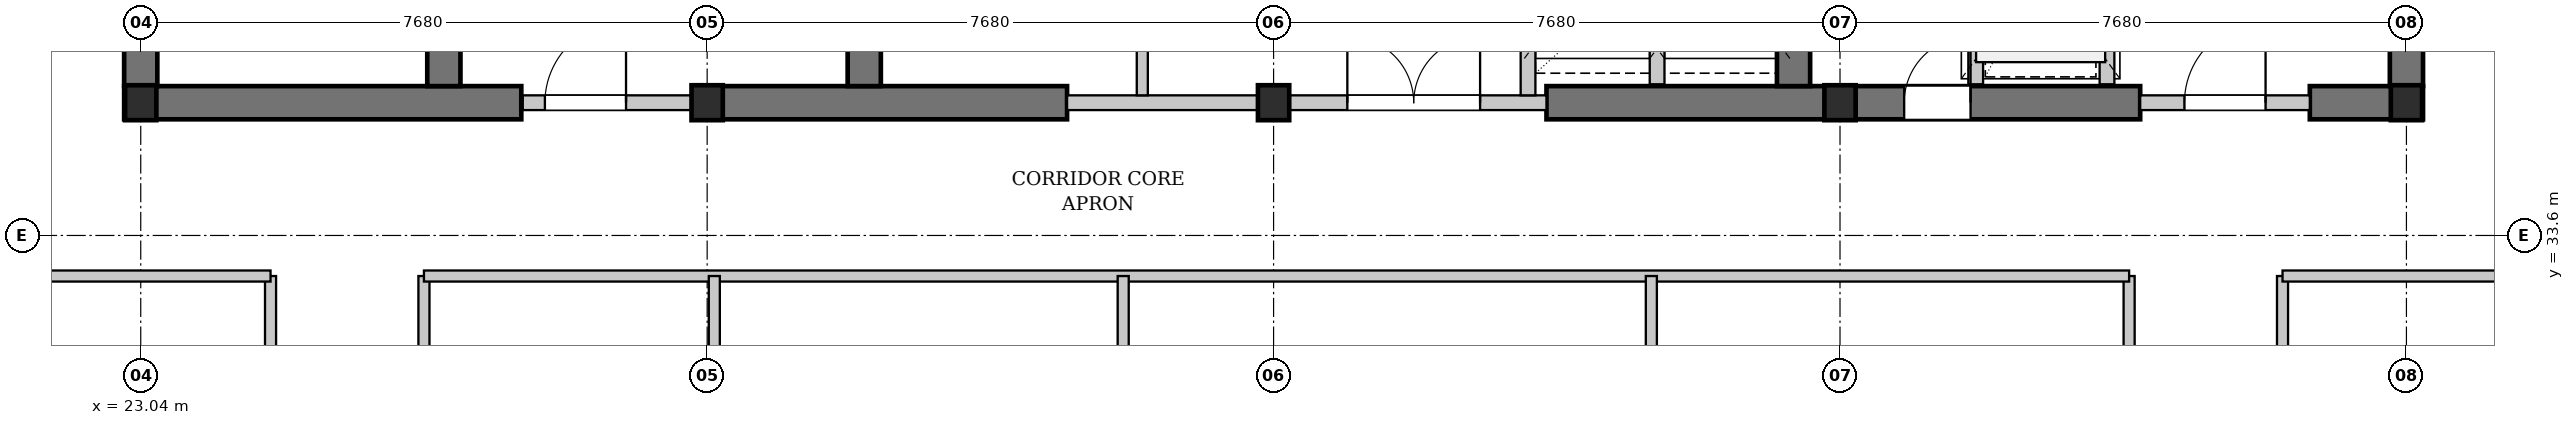
"""IFC4 building model, lengths in metres.
Left out: names, types, materials, properties, quantities, classifications, styles, units other than length and angle.
Written with IfcOpenShell. Run it as: python <this file> out.ifc"""

import sys

from ifc_helpers import new_model, si_unit, direction, frame, frame_2d, origin, origin_2d, place, context, subcontext, project, spatial, rectangle, i_section, extrude, element, fill, save


model = new_model("IFC4")
c1 = context("Model", 3, precision=1e-05, world=origin(), true_north=direction((0.0, 1.0)))
c2 = subcontext(c1, "Body", "Model", "MODEL_VIEW")
j1 = project(units=[si_unit("LENGTHUNIT", "METRE"), si_unit("PLANEANGLEUNIT", "RADIAN")], contexts=[c1])
p1 = place(None, origin())
s1 = spatial("IfcSite", under=j1, at=p1, CompositionType="ELEMENT")
p2 = place(p1, origin())
s2 = spatial("IfcBuilding", under=s1, at=p2, CompositionType="ELEMENT")
p3 = place(p2, frame((0.0, 0.0, 123.7)))
s3 = spatial("IfcBuildingStorey", under=s2, at=p3, CompositionType="ELEMENT", Elevation=123.7)
p4 = place(p3, frame((22.815, 35.4, 0.0), z_axis=(0.0, 0.0, 1.0), x_axis=(1.0, 0.0, 0.0)))
e1 = element("IfcWall", 1, at=p4, inside=s3, PredefinedType="SHEAR", context=c2, shape_type="SweptSolid", body=[
    extrude(rectangle(XDim=5.385, YDim=0.45, at=frame_2d((2.692, 0.0))), origin(), (0.0, 0.0, 1.0), 3.18),
])
p5 = place(p3, frame((30.72, 35.4, 0.0), z_axis=(0.0, 0.0, 1.0), x_axis=(1.0, 0.0, 0.0)))
e2 = element("IfcWall", 2, at=p5, inside=s3, PredefinedType="SHEAR", context=c2, shape_type="SweptSolid", body=[
    extrude(rectangle(XDim=4.88, YDim=0.45, at=frame_2d((2.44, 0.0))), origin(), (0.0, 0.0, 1.0), 3.18),
])
p6 = place(p3, frame((42.1, 35.4, 0.0), z_axis=(0.0, 0.0, 1.0), x_axis=(1.0, 0.0, 0.0)))
e3 = element("IfcWall", 3, at=p6, inside=s3, PredefinedType="SHEAR", context=c2, shape_type="SweptSolid", body=[
    extrude(rectangle(XDim=8.05, YDim=0.45, at=frame_2d((4.025, 0.0))), origin(), (0.0, 0.0, 1.0), 3.18),
])
p7 = place(p6, frame((4.85, 0.0, 0.0)))
e4 = element("IfcOpeningElement", 4, at=p7, cuts=e3, PredefinedType="OPENING", context=c2, shape_type="SweptSolid", body=[
    extrude(rectangle(XDim=0.9, YDim=2.15, at=frame_2d((0.45, 1.075))), frame((0.0, 0.235, 0.0), z_axis=(0.0, -1.0, 0.0), x_axis=(1.0, 0.0, 0.0)), (0.0, 0.0, 1.0), 0.47),
])
p8 = place(p3, frame((52.45, 35.4, 0.0), z_axis=(0.0, 0.0, 1.0), x_axis=(1.0, 0.0, 0.0)))
e5 = element("IfcWall", 5, at=p8, inside=s3, PredefinedType="SHEAR", context=c2, shape_type="SweptSolid", body=[
    extrude(rectangle(XDim=1.535, YDim=0.45, at=frame_2d((0.768, 0.0))), origin(), (0.0, 0.0, 1.0), 3.18),
])
p9 = place(p3, frame((23.04, 35.625, 0.0), z_axis=(0.0, 0.0, 1.0), x_axis=(0.0, 1.0, 0.0)))
e6 = element("IfcWall", 6, at=p9, inside=s3, PredefinedType="SHEAR", context=c2, shape_type="SweptSolid", body=[
    extrude(rectangle(XDim=10.35, YDim=0.45, at=frame_2d((5.175, 0.0))), origin(), (0.0, 0.0, 1.0), 3.18),
])
p10 = place(p3, frame((27.15, 35.625, 0.0), z_axis=(0.0, 0.0, 1.0), x_axis=(0.0, 1.0, 0.0)))
e7 = element("IfcWall", 7, at=p10, inside=s3, PredefinedType="SHEAR", context=c2, shape_type="SweptSolid", body=[
    extrude(rectangle(XDim=10.35, YDim=0.45, at=frame_2d((5.175, 0.0))), origin(), (0.0, 0.0, 1.0), 3.18),
])
p11 = place(p10, frame((0.675, 0.0, 0.0)))
e8 = element("IfcOpeningElement", 8, at=p11, cuts=e7, PredefinedType="OPENING", context=c2, shape_type="SweptSolid", body=[
    extrude(rectangle(XDim=1.1, YDim=2.15, at=frame_2d((0.55, 1.075))), frame((0.0, 0.235, 0.0), z_axis=(0.0, -1.0, 0.0), x_axis=(1.0, 0.0, 0.0)), (0.0, 0.0, 1.0), 0.47),
])
for number, where, z_axis, x_axis in (
    (9, (32.85, 35.625, 0.0), (0.0, 0.0, 1.0), (0.0, 1.0, 0.0)),
    (10, (45.45, 35.625, 0.0), (0.0, 0.0, 1.0), (0.0, 1.0, 0.0)),
    (11, (53.76, 35.625, 0.0), (0.0, 0.0, 1.0), (0.0, 1.0, 0.0)),
):
    element("IfcWall", number, at=place(p3, frame(where, z_axis=z_axis, x_axis=x_axis)), inside=s3, PredefinedType="SHEAR", context=c2, shape_type="SweptSolid", body=[
        extrude(rectangle(XDim=10.35, YDim=0.45, at=frame_2d((5.175, 0.0))), origin(), (0.0, 0.0, 1.0), 3.18),
    ])
for number, where, z_axis, x_axis in (
    (12, (23.04, 35.4, 0.0), (0.0, 0.0, 1.0), (1.0, 0.0, 0.0)),
    (13, (30.72, 35.4, 0.0), (0.0, 0.0, 1.0), (1.0, 0.0, 0.0)),
    (14, (38.4, 35.4, 0.0), (0.0, 0.0, 1.0), (1.0, 0.0, 0.0)),
    (15, (46.08, 35.4, 0.0), (0.0, 0.0, 1.0), (1.0, 0.0, 0.0)),
    (16, (53.76, 35.4, 0.0), (0.0, 0.0, 1.0), (1.0, 0.0, 0.0)),
):
    element("IfcColumn", number, at=place(p3, frame(where, z_axis=z_axis, x_axis=x_axis)), inside=s3, PredefinedType="COLUMN", context=c2, shape_type="SweptSolid", body=[
        extrude(i_section(OverallWidth=0.424, OverallDepth=0.474, WebThickness=0.047, FlangeThickness=0.077, FilletRadius=0.015, at=origin_2d()), origin(), (0.0, 0.0, 1.0), 3.4),
    ])
p12 = place(p3, frame((28.22, 35.4, 0.0), z_axis=(0.0, 0.0, 1.0), x_axis=(1.0, 0.0, 0.0)))
e17 = element("IfcWall", 17, at=p12, inside=s3, PredefinedType="PARTITIONING", context=c2, shape_type="SweptSolid", body=[
    extrude(rectangle(XDim=2.5, YDim=0.2, at=frame_2d((1.25, 0.0))), origin(), (0.0, 0.0, 1.0), 2.525),
])
p13 = place(p12, frame((0.3, 0.0, 0.0)))
e18 = element("IfcOpeningElement", 18, at=p13, cuts=e17, PredefinedType="OPENING", context=c2, shape_type="SweptSolid", body=[
    extrude(rectangle(XDim=1.1, YDim=2.15, at=frame_2d((0.55, 1.075))), frame((0.0, 0.11, 0.0), z_axis=(0.0, -1.0, 0.0), x_axis=(1.0, 0.0, 0.0)), (0.0, 0.0, 1.0), 0.22),
])
p14 = place(p3, frame((35.6, 35.4, 0.0), z_axis=(0.0, 0.0, 1.0), x_axis=(1.0, 0.0, 0.0)))
e19 = element("IfcWall", 19, at=p14, inside=s3, PredefinedType="PARTITIONING", context=c2, shape_type="SweptSolid", body=[
    extrude(rectangle(XDim=6.5, YDim=0.2, at=frame_2d((3.25, 0.0))), origin(), (0.0, 0.0, 1.0), 2.525),
])
p15 = place(p14, frame((3.8, 0.0, 0.0)))
e20 = element("IfcOpeningElement", 20, at=p15, cuts=e19, PredefinedType="OPENING", context=c2, shape_type="SweptSolid", body=[
    extrude(rectangle(XDim=1.8, YDim=2.3, at=frame_2d((0.9, 1.15))), frame((0.0, 0.11, 0.0), z_axis=(0.0, -1.0, 0.0), x_axis=(1.0, 0.0, 0.0)), (0.0, 0.0, 1.0), 0.22),
])
p16 = place(p3, frame((36.62, 35.5, 0.0), z_axis=(0.0, 0.0, 1.0), x_axis=(0.0, 1.0, 0.0)))
e21 = element("IfcWall", 21, at=p16, inside=s3, PredefinedType="PARTITIONING", context=c2, shape_type="SweptSolid", body=[
    extrude(rectangle(XDim=10.42, YDim=0.15, at=frame_2d((5.21, 0.0))), origin(), (0.0, 0.0, 1.0), 3.18),
])
p17 = place(p16, frame((3.92, 0.0, 0.0)))
e22 = element("IfcOpeningElement", 22, at=p17, cuts=e21, PredefinedType="OPENING", context=c2, shape_type="SweptSolid", body=[
    extrude(rectangle(XDim=0.9, YDim=2.15, at=frame_2d((0.45, 1.075))), frame((0.0, 0.085, 0.0), z_axis=(0.0, -1.0, 0.0), x_axis=(1.0, 0.0, 0.0)), (0.0, 0.0, 1.0), 0.17),
])
p18 = place(p16, frame((5.85, 0.0, 0.0)))
e23 = element("IfcOpeningElement", 23, at=p18, cuts=e21, PredefinedType="OPENING", context=c2, shape_type="SweptSolid", body=[
    extrude(rectangle(XDim=0.9, YDim=2.15, at=frame_2d((0.45, 1.075))), frame((0.0, 0.085, 0.0), z_axis=(0.0, -1.0, 0.0), x_axis=(1.0, 0.0, 0.0)), (0.0, 0.0, 1.0), 0.17),
])
p19 = place(p3, frame((43.6, 35.65, 0.0), z_axis=(0.0, 0.0, 1.0), x_axis=(0.0, 1.0, 0.0)))
e24 = element("IfcWall", 24, at=p19, inside=s3, PredefinedType="PARTITIONING", context=c2, shape_type="SweptSolid", body=[
    extrude(rectangle(XDim=3.25, YDim=0.2, at=frame_2d((1.625, 0.0))), origin(), (0.0, 0.0, 1.0), 3.18),
])
p20 = place(p3, frame((41.85, 35.5, 0.0), z_axis=(0.0, 0.0, 1.0), x_axis=(0.0, 1.0, 0.0)))
e25 = element("IfcWall", 25, at=p20, inside=s3, PredefinedType="PARTITIONING", context=c2, shape_type="SweptSolid", body=[
    extrude(rectangle(XDim=3.4, YDim=0.2, at=frame_2d((1.7, 0.0))), origin(), (0.0, 0.0, 1.0), 3.18),
])
p21 = place(p3, frame((50.15, 35.4, 0.0), z_axis=(0.0, 0.0, 1.0), x_axis=(1.0, 0.0, 0.0)))
e26 = element("IfcWall", 26, at=p21, inside=s3, PredefinedType="PARTITIONING", context=c2, shape_type="SweptSolid", body=[
    extrude(rectangle(XDim=2.3, YDim=0.2, at=frame_2d((1.15, 0.0))), origin(), (0.0, 0.0, 1.0), 2.525),
])
p22 = place(p21, frame((0.6, 0.0, 0.0)))
e27 = element("IfcOpeningElement", 27, at=p22, cuts=e26, PredefinedType="OPENING", context=c2, shape_type="SweptSolid", body=[
    extrude(rectangle(XDim=1.1, YDim=2.15, at=frame_2d((0.55, 1.075))), frame((0.0, 0.11, 0.0), z_axis=(0.0, -1.0, 0.0), x_axis=(1.0, 0.0, 0.0)), (0.0, 0.0, 1.0), 0.22),
])
p23 = place(p3, frame((49.7, 35.65, 0.0), z_axis=(0.0, 0.0, 1.0), x_axis=(0.0, 1.0, 0.0)))
e28 = element("IfcWall", 28, at=p23, inside=s3, PredefinedType="PARTITIONING", context=c2, shape_type="SweptSolid", body=[
    extrude(rectangle(XDim=3.15, YDim=0.2, at=frame_2d((1.575, 0.0))), origin(), (0.0, 0.0, 1.0), 3.18),
])
p24 = place(p23, frame((0.85, 0.0, 0.0)))
e29 = element("IfcOpeningElement", 29, at=p24, cuts=e28, PredefinedType="OPENING", context=c2, shape_type="SweptSolid", body=[
    extrude(rectangle(XDim=1.2, YDim=2.2, at=frame_2d((0.6, 1.1))), frame((0.0, 0.11, 0.0), z_axis=(0.0, -1.0, 0.0), x_axis=(1.0, 0.0, 0.0)), (0.0, 0.0, 1.0), 0.22),
])
p25 = place(p3, frame((47.92, 35.65, 0.0), z_axis=(0.0, 0.0, 1.0), x_axis=(0.0, 1.0, 0.0)))
e30 = element("IfcWall", 30, at=p25, inside=s3, PredefinedType="PARTITIONING", context=c2, shape_type="SweptSolid", body=[
    extrude(rectangle(XDim=3.15, YDim=0.2, at=frame_2d((1.575, 0.0))), origin(), (0.0, 0.0, 1.0), 3.18),
])
for number, where, z_axis, x_axis in (
    (31, (24.8, 22.53, 0.0), (0.0, 0.0, 1.0), (0.0, 1.0, 0.0)),
    (32, (26.88, 22.53, 0.0), (0.0, 0.0, 1.0), (0.0, 1.0, 0.0)),
    (33, (50.0, 22.53, 0.0), (0.0, 0.0, 1.0), (0.0, 1.0, 0.0)),
    (34, (52.08, 22.53, 0.0), (0.0, 0.0, 1.0), (0.0, 1.0, 0.0)),
):
    element("IfcWall", number, at=place(p3, frame(where, z_axis=z_axis, x_axis=x_axis)), inside=s3, PredefinedType="PARTITIONING", context=c2, shape_type="SweptSolid", body=[
        extrude(rectangle(XDim=10.52, YDim=0.15, at=frame_2d((5.26, 0.0))), origin(), (0.0, 0.0, 1.0), 3.18),
    ])
p26 = place(p3, frame((20.614, 33.05, 0.0), z_axis=(0.0, 0.0, 1.0), x_axis=(1.0, 0.0, 0.0)))
e35 = element("IfcWall", 35, at=p26, inside=s3, PredefinedType="PARTITIONING", context=c2, shape_type="SweptSolid", body=[
    extrude(rectangle(XDim=4.186, YDim=0.15, at=frame_2d((2.093, 0.0))), origin(), (0.0, 0.0, 1.0), 3.18),
])
p27 = place(p3, frame((26.88, 33.05, 0.0), z_axis=(0.0, 0.0, 1.0), x_axis=(1.0, 0.0, 0.0)))
e36 = element("IfcWall", 36, at=p27, inside=s3, PredefinedType="PARTITIONING", context=c2, shape_type="SweptSolid", body=[
    extrude(rectangle(XDim=23.12, YDim=0.15, at=frame_2d((11.56, 0.0))), origin(), (0.0, 0.0, 1.0), 3.18),
])
p28 = place(p3, frame((52.08, 33.05, 0.0), z_axis=(0.0, 0.0, 1.0), x_axis=(1.0, 0.0, 0.0)))
e37 = element("IfcWall", 37, at=p28, inside=s3, PredefinedType="PARTITIONING", context=c2, shape_type="SweptSolid", body=[
    extrude(rectangle(XDim=18.156, YDim=0.15, at=frame_2d((9.078, 0.0))), origin(), (0.0, 0.0, 1.0), 2.525),
])
p29 = place(p3, frame((30.817, 22.53, 0.0), z_axis=(0.0, 0.0, 1.0), x_axis=(0.0, 1.0, 0.0)))
e38 = element("IfcWall", 38, at=p29, inside=s3, PredefinedType="PARTITIONING", context=c2, shape_type="SweptSolid", body=[
    extrude(rectangle(XDim=10.52, YDim=0.15, at=frame_2d((5.26, 0.0))), origin(), (0.0, 0.0, 1.0), 2.525),
])
for number, where, z_axis, x_axis in (
    (39, (36.361, 22.53, 0.0), (0.0, 0.0, 1.0), (0.0, 1.0, 0.0)),
    (40, (43.522, 22.53, 0.0), (0.0, 0.0, 1.0), (0.0, 1.0, 0.0)),
):
    element("IfcWall", number, at=place(p3, frame(where, z_axis=z_axis, x_axis=x_axis)), inside=s3, PredefinedType="PARTITIONING", context=c2, shape_type="SweptSolid", body=[
        extrude(rectangle(XDim=10.52, YDim=0.15, at=frame_2d((5.26, 0.0))), origin(), (0.0, 0.0, 1.0), 3.18),
    ])
p30 = place(p13, origin())
e41 = element("IfcDoor", 41, at=p30, inside=s3, OperationType="SINGLE_SWING_RIGHT", PredefinedType="DOOR", context=c2, shape_type="SweptSolid", body=[
    extrude(rectangle(XDim=1.1, YDim=2.15, at=frame_2d((0.55, 1.075))), frame((0.0, 0.025, 0.0), z_axis=(0.0, -1.0, 0.0), x_axis=(1.0, 0.0, 0.0)), (0.0, 0.0, 1.0), 0.05),
])
fill(e18, e41)
p31 = place(p15, origin())
e42 = element("IfcDoor", 42, at=p31, inside=s3, OperationType="DOUBLE_DOOR_SINGLE_SWING", PredefinedType="DOOR", context=c2, shape_type="SweptSolid", body=[
    extrude(rectangle(XDim=1.8, YDim=2.3, at=frame_2d((0.9, 1.15))), frame((0.0, 0.025, 0.0), z_axis=(0.0, -1.0, 0.0), x_axis=(1.0, 0.0, 0.0)), (0.0, 0.0, 1.0), 0.05),
])
fill(e20, e42)
p32 = place(p22, origin())
e43 = element("IfcDoor", 43, at=p32, inside=s3, OperationType="SINGLE_SWING_RIGHT", PredefinedType="DOOR", context=c2, shape_type="SweptSolid", body=[
    extrude(rectangle(XDim=1.1, YDim=2.15, at=frame_2d((0.55, 1.075))), frame((0.0, 0.025, 0.0), z_axis=(0.0, -1.0, 0.0), x_axis=(1.0, 0.0, 0.0)), (0.0, 0.0, 1.0), 0.05),
])
fill(e27, e43)
p33 = place(p7, origin())
e44 = element("IfcDoor", 44, at=p33, inside=s3, OperationType="SINGLE_SWING_RIGHT", PredefinedType="DOOR", context=c2, shape_type="SweptSolid", body=[
    extrude(rectangle(XDim=0.9, YDim=2.15, at=frame_2d((0.45, 1.075))), frame((0.0, 0.025, 0.0), z_axis=(0.0, -1.0, 0.0), x_axis=(1.0, 0.0, 0.0)), (0.0, 0.0, 1.0), 0.05),
])
fill(e4, e44)
save(model, sys.argv[1])
